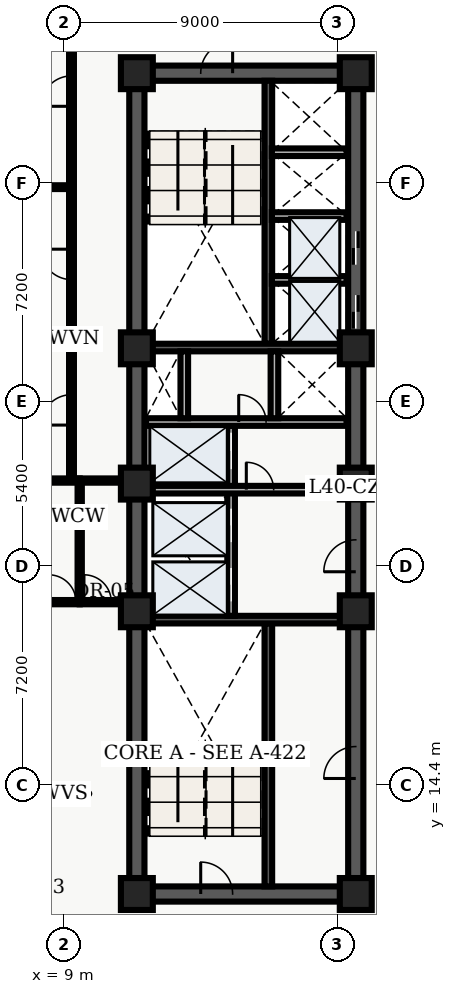
"""IFC4 building model, lengths in metres.
Left out: names, types, materials, properties, quantities, classifications, styles, units other than length and angle.
Written with IfcOpenShell. Run it as: python <this file> out.ifc"""

import sys

from ifc_helpers import new_model, entity, si_unit, converted_unit, direction, frame, origin_with_axes, origin_2d_with_axis, place, context, subcontext, project, spatial, polyline, rectangle, outline, extrude, element, fill, save


model = new_model("IFC4")
c1 = context("Model", 3, precision=1e-05, world=origin_with_axes(), true_north=direction((0.0, 1.0)))
c2 = subcontext(c1, "Body", "Model", "MODEL_VIEW")
j1 = project(units=[si_unit("LENGTHUNIT", "METRE"), converted_unit("PLANEANGLEUNIT", "DEGREE", entity("IfcPlaneAngleMeasure", 0.017), si_unit("PLANEANGLEUNIT", "RADIAN"), dimensions=[0, 0, 0, 0, 0, 0, 0])], contexts=[c1])
p1 = place(None, origin_with_axes())
s1 = spatial("IfcSite", under=j1, at=p1, CompositionType="ELEMENT")
p2 = place(p1, origin_with_axes())
s2 = spatial("IfcBuilding", under=s1, at=p2, CompositionType="ELEMENT")
p3 = place(p2, frame((0.0, 0.0, 164.1), z_axis=(0.0, 0.0, 1.0), x_axis=(1.0, 0.0, 0.0)))
s3 = spatial("IfcBuildingStorey", under=s2, at=p3, CompositionType="ELEMENT", Elevation=164.1)
p4 = place(p3, frame((11.4, 10.8, 0.0), z_axis=(0.0, 0.0, 1.0), x_axis=(0.0, 1.0, 0.0)))
e1 = element("IfcWall", 1, at=p4, inside=s3, PredefinedType="SHEAR", context=c2, shape_type="SweptSolid", body=[
    extrude(outline(polyline([(0.0, -0.25), (27.0, -0.25), (27.0, 0.25), (0.0, 0.25), (0.0, -0.25)])), origin_with_axes(), (0.0, 0.0, 1.0), 3.66),
])
p5 = place(p3, frame((11.4, 10.8, 0.0), z_axis=(0.0, 0.0, 1.0), x_axis=(1.0, 0.0, 0.0)))
e2 = element("IfcWall", 2, at=p5, inside=s3, PredefinedType="SHEAR", context=c2, shape_type="SweptSolid", body=[
    extrude(outline(polyline([(0.0, -0.25), (7.2, -0.25), (7.2, 0.25), (0.0, 0.25), (0.0, -0.25)])), origin_with_axes(), (0.0, 0.0, 1.0), 3.66),
])
p6 = place(p5, frame((2.625, 0.0, 0.0), z_axis=(0.0, 0.0, 1.0), x_axis=(1.0, 0.0, 0.0)))
e3 = element("IfcOpeningElement", 3, at=p6, cuts=e2, PredefinedType="OPENING", context=c2, shape_type="SweptSolid", body=[
    extrude(rectangle(XDim=1.05, YDim=0.52, at=origin_2d_with_axis()), origin_with_axes(), (0.0, 0.0, 1.0), 2.15),
])
p7 = place(p3, frame((11.4, 37.8, 0.0), z_axis=(0.0, 0.0, 1.0), x_axis=(1.0, 0.0, 0.0)))
e4 = element("IfcWall", 4, at=p7, inside=s3, PredefinedType="SHEAR", context=c2, shape_type="SweptSolid", body=[
    extrude(outline(polyline([(0.0, -0.25), (7.2, -0.25), (7.2, 0.25), (0.0, 0.25), (0.0, -0.25)])), origin_with_axes(), (0.0, 0.0, 1.0), 3.66),
])
p8 = place(p7, frame((2.625, 0.0, 0.0), z_axis=(0.0, 0.0, 1.0), x_axis=(1.0, 0.0, 0.0)))
e5 = element("IfcOpeningElement", 5, at=p8, cuts=e4, PredefinedType="OPENING", context=c2, shape_type="SweptSolid", body=[
    extrude(rectangle(XDim=1.05, YDim=0.52, at=origin_2d_with_axis()), origin_with_axes(), (0.0, 0.0, 1.0), 2.15),
])
p9 = place(p3, frame((18.6, 10.8, 0.0), z_axis=(0.0, 0.0, 1.0), x_axis=(0.0, 1.0, 0.0)))
e6 = element("IfcWall", 6, at=p9, inside=s3, PredefinedType="SHEAR", context=c2, shape_type="SweptSolid", body=[
    extrude(outline(polyline([(0.0, -0.25), (13.5, -0.25), (13.5, 0.25), (0.0, 0.25), (0.0, -0.25)])), origin_with_axes(), (0.0, 0.0, 1.0), 3.66),
])
p10 = place(p9, frame((11.125, 0.0, 0.0), z_axis=(0.0, 0.0, 1.0), x_axis=(1.0, 0.0, 0.0)))
e7 = element("IfcOpeningElement", 7, at=p10, cuts=e6, PredefinedType="OPENING", context=c2, shape_type="SweptSolid", body=[
    extrude(rectangle(XDim=1.05, YDim=0.52, at=origin_2d_with_axis()), origin_with_axes(), (0.0, 0.0, 1.0), 2.15),
])
p11 = place(p9, frame((4.325, 0.0, 0.0), z_axis=(0.0, 0.0, 1.0), x_axis=(1.0, 0.0, 0.0)))
e8 = element("IfcOpeningElement", 8, at=p11, cuts=e6, PredefinedType="OPENING", context=c2, shape_type="SweptSolid", body=[
    extrude(rectangle(XDim=1.05, YDim=0.52, at=origin_2d_with_axis()), origin_with_axes(), (0.0, 0.0, 1.0), 2.15),
])
p12 = place(p3, frame((18.6, 24.3, 0.0), z_axis=(0.0, 0.0, 1.0), x_axis=(0.0, 1.0, 0.0)))
e9 = element("IfcWall", 9, at=p12, inside=s3, PredefinedType="SHEAR", context=c2, shape_type="SweptSolid", body=[
    extrude(outline(polyline([(0.0, -0.25), (13.5, -0.25), (13.5, 0.25), (0.0, 0.25), (0.0, -0.25)])), origin_with_axes(), (0.0, 0.0, 1.0), 3.66),
])
p13 = place(p12, frame((5.65, 0.0, 0.0), z_axis=(0.0, 0.0, 1.0), x_axis=(1.0, 0.0, 0.0)))
e10 = element("IfcOpeningElement", 10, at=p13, cuts=e9, PredefinedType="OPENING", context=c2, shape_type="SweptSolid", body=[
    extrude(rectangle(XDim=1.1, YDim=0.52, at=origin_2d_with_axis()), origin_with_axes(), (0.0, 0.0, 1.0), 2.15),
])
p14 = place(p12, frame((7.75, 0.0, 0.0), z_axis=(0.0, 0.0, 1.0), x_axis=(1.0, 0.0, 0.0)))
e11 = element("IfcOpeningElement", 11, at=p14, cuts=e9, PredefinedType="OPENING", context=c2, shape_type="SweptSolid", body=[
    extrude(rectangle(XDim=1.1, YDim=0.52, at=origin_2d_with_axis()), origin_with_axes(), (0.0, 0.0, 1.0), 2.15),
])
p15 = place(p3, frame((15.725, 11.05, 0.0), z_axis=(0.0, 0.0, 1.0), x_axis=(0.0, 1.0, 0.0)))
e12 = element("IfcWall", 12, at=p15, inside=s3, PredefinedType="SHEAR", context=c2, shape_type="SweptSolid", body=[
    extrude(outline(polyline([(0.0, -0.125), (8.65, -0.125), (8.65, 0.125), (0.0, 0.125), (0.0, -0.125)])), origin_with_axes(), (0.0, 0.0, 1.0), 3.66),
])
p16 = place(p3, frame((11.65, 19.825, 0.0), z_axis=(0.0, 0.0, 1.0), x_axis=(1.0, 0.0, 0.0)))
e13 = element("IfcWall", 13, at=p16, inside=s3, PredefinedType="SHEAR", context=c2, shape_type="SweptSolid", body=[
    extrude(outline(polyline([(0.0, -0.125), (6.7, -0.125), (6.7, 0.125), (0.0, 0.125), (0.0, -0.125)])), origin_with_axes(), (0.0, 0.0, 1.0), 3.66),
])
p17 = place(p3, frame((15.725, 28.9, 0.0), z_axis=(0.0, 0.0, 1.0), x_axis=(0.0, 1.0, 0.0)))
e14 = element("IfcWall", 14, at=p17, inside=s3, PredefinedType="SHEAR", context=c2, shape_type="SweptSolid", body=[
    extrude(outline(polyline([(0.0, -0.125), (8.65, -0.125), (8.65, 0.125), (0.0, 0.125), (0.0, -0.125)])), origin_with_axes(), (0.0, 0.0, 1.0), 3.66),
])
p18 = place(p3, frame((11.65, 28.775, 0.0), z_axis=(0.0, 0.0, 1.0), x_axis=(1.0, 0.0, 0.0)))
e15 = element("IfcWall", 15, at=p18, inside=s3, PredefinedType="SHEAR", context=c2, shape_type="SweptSolid", body=[
    extrude(outline(polyline([(0.0, -0.125), (6.7, -0.125), (6.7, 0.125), (0.0, 0.125), (0.0, -0.125)])), origin_with_axes(), (0.0, 0.0, 1.0), 3.66),
])
p19 = place(p3, frame((14.5, 19.95, 0.0), z_axis=(0.0, 0.0, 1.0), x_axis=(0.0, 1.0, 0.0)))
e16 = element("IfcWall", 16, at=p19, inside=s3, PredefinedType="SOLIDWALL", context=c2, shape_type="SweptSolid", body=[
    extrude(outline(polyline([(0.0, -0.125), (6.25, -0.125), (6.25, 0.125), (0.0, 0.125), (0.0, -0.125)])), origin_with_axes(), (0.0, 0.0, 1.0), 2.7),
])
p20 = place(p19, frame((1.025, 0.0, 0.0), z_axis=(0.0, 0.0, 1.0), x_axis=(1.0, 0.0, 0.0)))
e17 = element("IfcOpeningElement", 17, at=p20, cuts=e16, PredefinedType="OPENING", context=c2, shape_type="SweptSolid", body=[
    extrude(rectangle(XDim=1.1, YDim=0.27, at=origin_2d_with_axis()), origin_with_axes(), (0.0, 0.0, 1.0), 2.15),
])
p21 = place(p19, frame((2.975, 0.0, 0.0), z_axis=(0.0, 0.0, 1.0), x_axis=(1.0, 0.0, 0.0)))
e18 = element("IfcOpeningElement", 18, at=p21, cuts=e16, PredefinedType="OPENING", context=c2, shape_type="SweptSolid", body=[
    extrude(rectangle(XDim=1.1, YDim=0.27, at=origin_2d_with_axis()), origin_with_axes(), (0.0, 0.0, 1.0), 2.15),
])
p22 = place(p19, frame((5.425, 0.0, 0.0), z_axis=(0.0, 0.0, 1.0), x_axis=(1.0, 0.0, 0.0)))
e19 = element("IfcOpeningElement", 19, at=p22, cuts=e16, PredefinedType="OPENING", context=c2, shape_type="SweptSolid", body=[
    extrude(rectangle(XDim=1.2, YDim=0.27, at=origin_2d_with_axis()), origin_with_axes(), (0.0, 0.0, 1.0), 2.15),
])
p23 = place(p3, frame((11.7, 24.1, 0.0), z_axis=(0.0, 0.0, 1.0), x_axis=(1.0, 0.0, 0.0)))
e20 = element("IfcWall", 20, at=p23, inside=s3, PredefinedType="SOLIDWALL", context=c2, shape_type="SweptSolid", body=[
    extrude(outline(polyline([(0.0, -0.125), (6.6, -0.125), (6.6, 0.125), (0.0, 0.125), (0.0, -0.125)])), origin_with_axes(), (0.0, 0.0, 1.0), 2.7),
])
p24 = place(p23, frame((3.75, 0.0, 0.0), z_axis=(0.0, 0.0, 1.0), x_axis=(1.0, 0.0, 0.0)))
e21 = element("IfcOpeningElement", 21, at=p24, cuts=e20, PredefinedType="OPENING", context=c2, shape_type="SweptSolid", body=[
    extrude(rectangle(XDim=0.9, YDim=0.27, at=origin_2d_with_axis()), origin_with_axes(), (0.0, 0.0, 1.0), 2.15),
])
p25 = place(p3, frame((11.7, 26.325, 0.0), z_axis=(0.0, 0.0, 1.0), x_axis=(1.0, 0.0, 0.0)))
e22 = element("IfcWall", 22, at=p25, inside=s3, PredefinedType="SOLIDWALL", context=c2, shape_type="SweptSolid", body=[
    extrude(outline(polyline([(0.0, -0.125), (6.6, -0.125), (6.6, 0.125), (0.0, 0.125), (0.0, -0.125)])), origin_with_axes(), (0.0, 0.0, 1.0), 2.7),
])
p26 = place(p25, frame((3.5, 0.0, 0.0), z_axis=(0.0, 0.0, 1.0), x_axis=(1.0, 0.0, 0.0)))
e23 = element("IfcOpeningElement", 23, at=p26, cuts=e22, PredefinedType="OPENING", context=c2, shape_type="SweptSolid", body=[
    extrude(rectangle(XDim=0.9, YDim=0.27, at=origin_2d_with_axis()), origin_with_axes(), (0.0, 0.0, 1.0), 2.15),
])
for number, where, z_axis, x_axis in (
    (24, (12.96, 26.45, 0.0), (0.0, 0.0, 1.0), (0.0, 1.0, 0.0)),
    (25, (15.925, 26.45, 0.0), (0.0, 0.0, 1.0), (0.0, 1.0, 0.0)),
):
    element("IfcWall", number, at=place(p3, frame(where, z_axis=z_axis, x_axis=x_axis)), inside=s3, PredefinedType="SOLIDWALL", context=c2, shape_type="SweptSolid", body=[
        extrude(outline(polyline([(0.0, -0.125), (2.2, -0.125), (2.2, 0.125), (0.0, 0.125), (0.0, -0.125)])), origin_with_axes(), (0.0, 0.0, 1.0), 2.7),
    ])
for number, where, z_axis, x_axis in (
    (26, (11.4, 10.8, 0.0), (0.0, 0.0, 1.0), (1.0, 0.0, 0.0)),
    (27, (11.4, 20.1, 0.0), (0.0, 0.0, 1.0), (1.0, 0.0, 0.0)),
    (28, (11.4, 24.3, 0.0), (0.0, 0.0, 1.0), (1.0, 0.0, 0.0)),
    (29, (11.4, 28.75, 0.0), (0.0, 0.0, 1.0), (1.0, 0.0, 0.0)),
    (30, (11.4, 37.8, 0.0), (0.0, 0.0, 1.0), (1.0, 0.0, 0.0)),
    (31, (18.6, 10.8, 0.0), (0.0, 0.0, 1.0), (1.0, 0.0, 0.0)),
    (32, (18.6, 20.1, 0.0), (0.0, 0.0, 1.0), (1.0, 0.0, 0.0)),
    (33, (18.6, 24.3, 0.0), (0.0, 0.0, 1.0), (1.0, 0.0, 0.0)),
    (34, (18.6, 28.75, 0.0), (0.0, 0.0, 1.0), (1.0, 0.0, 0.0)),
    (35, (18.6, 37.8, 0.0), (0.0, 0.0, 1.0), (1.0, 0.0, 0.0)),
):
    element("IfcColumn", number, at=place(p3, frame(where, z_axis=z_axis, x_axis=x_axis)), inside=s3, PredefinedType="COLUMN", context=c2, shape_type="SweptSolid", body=[
        extrude(rectangle(XDim=1.05, YDim=1.05, at=origin_2d_with_axis()), origin_with_axes(), (0.0, 0.0, 1.0), 3.9),
    ])
for number, where, z_axis, x_axis in (
    (36, (15.84, 31.0, 0.0), (0.0, 0.0, 1.0), (1.0, 0.0, 0.0)),
    (37, (15.84, 33.1, 0.0), (0.0, 0.0, 1.0), (1.0, 0.0, 0.0)),
    (38, (15.84, 35.2, 0.0), (0.0, 0.0, 1.0), (1.0, 0.0, 0.0)),
):
    element("IfcWall", number, at=place(p3, frame(where, z_axis=z_axis, x_axis=x_axis)), inside=s3, PredefinedType="SOLIDWALL", context=c2, shape_type="SweptSolid", body=[
        extrude(outline(polyline([(0.0, -0.125), (2.46, -0.125), (2.46, 0.125), (0.0, 0.125), (0.0, -0.125)])), origin_with_axes(), (0.0, 0.0, 1.0), 2.7),
    ])
p27 = place(p3, frame((9.52, 20.4, 0.0), z_axis=(0.0, 0.0, 1.0), x_axis=(0.0, 1.0, 0.0)))
e39 = element("IfcWall", 39, at=p27, inside=s3, PredefinedType="PARTITIONING", context=c2, shape_type="SweptSolid", body=[
    extrude(outline(polyline([(0.0, -0.07), (4.0, -0.07), (4.0, 0.07), (0.0, 0.07), (0.0, -0.07)])), origin_with_axes(), (0.0, 0.0, 1.0), 2.7),
])
p28 = place(p3, frame((9.52, 20.4, 0.0), z_axis=(0.0, 0.0, 1.0), x_axis=(1.0, 0.0, 0.0)))
e40 = element("IfcWall", 40, at=p28, inside=s3, PredefinedType="PARTITIONING", context=c2, shape_type="SweptSolid", body=[
    extrude(outline(polyline([(0.0, -0.07), (1.58, -0.07), (1.58, 0.07), (0.0, 0.07), (0.0, -0.07)])), origin_with_axes(), (0.0, 0.0, 1.0), 2.7),
])
p29 = place(p28, frame((0.59, 0.0, 0.0), z_axis=(0.0, 0.0, 1.0), x_axis=(1.0, 0.0, 0.0)))
e41 = element("IfcOpeningElement", 41, at=p29, cuts=e40, PredefinedType="OPENING", context=c2, shape_type="SweptSolid", body=[
    extrude(rectangle(XDim=0.9, YDim=0.16, at=origin_2d_with_axis()), origin_with_axes(), (0.0, 0.0, 1.0), 2.15),
])
p30 = place(p3, frame((9.52, 24.4, 0.0), z_axis=(0.0, 0.0, 1.0), x_axis=(1.0, 0.0, 0.0)))
e42 = element("IfcWall", 42, at=p30, inside=s3, PredefinedType="PARTITIONING", context=c2, shape_type="SweptSolid", body=[
    extrude(outline(polyline([(0.0, -0.07), (1.58, -0.07), (1.58, 0.07), (0.0, 0.07), (0.0, -0.07)])), origin_with_axes(), (0.0, 0.0, 1.0), 2.7),
])
p31 = place(p3, frame((9.25, 24.4, 0.0), z_axis=(0.0, 0.0, 1.0), x_axis=(0.0, 1.0, 0.0)))
e43 = element("IfcWall", 43, at=p31, inside=s3, PredefinedType="PARTITIONING", context=c2, shape_type="SweptSolid", body=[
    extrude(outline(polyline([(0.0, -0.08), (16.1, -0.08), (16.1, 0.08), (0.0, 0.08), (0.0, -0.08)])), origin_with_axes(), (0.0, 0.0, 1.0), 2.7),
])
p32 = place(p31, frame((2.325, 0.0, 0.0), z_axis=(0.0, 0.0, 1.0), x_axis=(1.0, 0.0, 0.0)))
e44 = element("IfcOpeningElement", 44, at=p32, cuts=e43, PredefinedType="OPENING", context=c2, shape_type="SweptSolid", body=[
    extrude(rectangle(XDim=1.0, YDim=0.18, at=origin_2d_with_axis()), origin_with_axes(), (0.0, 0.0, 1.0), 2.15),
])
p33 = place(p31, frame((7.111, 0.0, 0.0), z_axis=(0.0, 0.0, 1.0), x_axis=(1.0, 0.0, 0.0)))
e45 = element("IfcOpeningElement", 45, at=p33, cuts=e43, PredefinedType="OPENING", context=c2, shape_type="SweptSolid", body=[
    extrude(rectangle(XDim=1.0, YDim=0.18, at=origin_2d_with_axis()), origin_with_axes(), (0.0, 0.0, 1.0), 2.15),
])
p34 = place(p31, frame((12.81, 0.0, 0.0), z_axis=(0.0, 0.0, 1.0), x_axis=(1.0, 0.0, 0.0)))
e46 = element("IfcOpeningElement", 46, at=p34, cuts=e43, PredefinedType="OPENING", context=c2, shape_type="SweptSolid", body=[
    extrude(rectangle(XDim=1.0, YDim=0.18, at=origin_2d_with_axis()), origin_with_axes(), (0.0, 0.0, 1.0), 2.15),
])
p35 = place(p3, frame((0.335, 20.4, 0.0), z_axis=(0.0, 0.0, 1.0), x_axis=(1.0, 0.0, 0.0)))
e47 = element("IfcWall", 47, at=p35, inside=s3, PredefinedType="PARTITIONING", context=c2, shape_type="SweptSolid", body=[
    extrude(outline(polyline([(0.0, -0.07), (9.185, -0.07), (9.185, 0.07), (0.0, 0.07), (0.0, -0.07)])), origin_with_axes(), (0.0, 0.0, 1.0), 2.7),
])
p36 = place(p35, frame((8.615, 0.0, 0.0), z_axis=(0.0, 0.0, 1.0), x_axis=(1.0, 0.0, 0.0)))
e48 = element("IfcOpeningElement", 48, at=p36, cuts=e47, PredefinedType="OPENING", context=c2, shape_type="SweptSolid", body=[
    extrude(rectangle(XDim=0.9, YDim=0.16, at=origin_2d_with_axis()), origin_with_axes(), (0.0, 0.0, 1.0), 2.15),
])
p37 = place(p3, frame((0.335, 24.4, 0.0), z_axis=(0.0, 0.0, 1.0), x_axis=(1.0, 0.0, 0.0)))
e49 = element("IfcWall", 49, at=p37, inside=s3, PredefinedType="PARTITIONING", context=c2, shape_type="SweptSolid", body=[
    extrude(outline(polyline([(0.0, -0.07), (9.185, -0.07), (9.185, 0.07), (0.0, 0.07), (0.0, -0.07)])), origin_with_axes(), (0.0, 0.0, 1.0), 2.7),
])
p38 = place(p3, frame((0.335, 28.97, 0.0), z_axis=(0.0, 0.0, 1.0), x_axis=(1.0, 0.0, 0.0)))
e50 = element("IfcWall", 50, at=p38, inside=s3, PredefinedType="PARTITIONING", context=c2, shape_type="SweptSolid", body=[
    extrude(outline(polyline([(0.0, -0.14), (8.795, -0.14), (8.795, 0.14), (0.0, 0.14), (0.0, -0.14)])), origin_with_axes(), (0.0, 0.0, 1.0), 2.7),
])
p39 = place(p3, frame((0.335, 34.051, 0.0), z_axis=(0.0, 0.0, 1.0), x_axis=(1.0, 0.0, 0.0)))
e51 = element("IfcWall", 51, at=p39, inside=s3, PredefinedType="PARTITIONING", context=c2, shape_type="SweptSolid", body=[
    extrude(outline(polyline([(0.0, -0.062), (8.795, -0.062), (8.795, 0.062), (0.0, 0.062), (0.0, -0.062)])), origin_with_axes(), (0.0, 0.0, 1.0), 2.7),
])
p40 = place(p12, frame((5.65, 0.0, 0.0), z_axis=(0.0, 0.0, 1.0), x_axis=(1.0, 0.0, 0.0)))
e52 = element("IfcDoor", 52, at=p40, inside=s3, OperationType="SLIDING_TO_LEFT", PredefinedType="DOOR", context=c2, shape_type="SweptSolid", body=[
    extrude(rectangle(XDim=1.1, YDim=0.09, at=origin_2d_with_axis()), origin_with_axes(), (0.0, 0.0, 1.0), 2.15),
])
fill(e10, e52)
p41 = place(p12, frame((7.75, 0.0, 0.0), z_axis=(0.0, 0.0, 1.0), x_axis=(1.0, 0.0, 0.0)))
e53 = element("IfcDoor", 53, at=p41, inside=s3, OperationType="SLIDING_TO_RIGHT", PredefinedType="DOOR", context=c2, shape_type="SweptSolid", body=[
    extrude(rectangle(XDim=1.1, YDim=0.09, at=origin_2d_with_axis()), origin_with_axes(), (0.0, 0.0, 1.0), 2.15),
])
fill(e11, e53)
p42 = place(p19, frame((1.025, 0.0, 0.0), z_axis=(0.0, 0.0, 1.0), x_axis=(1.0, 0.0, 0.0)))
e54 = element("IfcDoor", 54, at=p42, inside=s3, OperationType="SLIDING_TO_LEFT", PredefinedType="DOOR", context=c2, shape_type="SweptSolid", body=[
    extrude(rectangle(XDim=1.1, YDim=0.09, at=origin_2d_with_axis()), origin_with_axes(), (0.0, 0.0, 1.0), 2.15),
])
fill(e17, e54)
p43 = place(p19, frame((2.975, 0.0, 0.0), z_axis=(0.0, 0.0, 1.0), x_axis=(1.0, 0.0, 0.0)))
e55 = element("IfcDoor", 55, at=p43, inside=s3, OperationType="SLIDING_TO_RIGHT", PredefinedType="DOOR", context=c2, shape_type="SweptSolid", body=[
    extrude(rectangle(XDim=1.1, YDim=0.09, at=origin_2d_with_axis()), origin_with_axes(), (0.0, 0.0, 1.0), 2.15),
])
fill(e18, e55)
p44 = place(p19, frame((5.425, 0.0, 0.0), z_axis=(0.0, 0.0, 1.0), x_axis=(1.0, 0.0, 0.0)))
e56 = element("IfcDoor", 56, at=p44, inside=s3, OperationType="DOUBLE_DOOR_SLIDING", PredefinedType="DOOR", context=c2, shape_type="SweptSolid", body=[
    extrude(rectangle(XDim=1.2, YDim=0.09, at=origin_2d_with_axis()), origin_with_axes(), (0.0, 0.0, 1.0), 2.15),
])
fill(e19, e56)
p45 = place(p5, frame((2.625, 0.0, 0.0), z_axis=(0.0, 0.0, 1.0), x_axis=(1.0, 0.0, 0.0)))
e57 = element("IfcDoor", 57, at=p45, inside=s3, OperationType="SINGLE_SWING_LEFT", PredefinedType="DOOR", context=c2, shape_type="SweptSolid", body=[
    extrude(rectangle(XDim=1.05, YDim=0.09, at=origin_2d_with_axis()), origin_with_axes(), (0.0, 0.0, 1.0), 2.15),
])
fill(e3, e57)
p46 = place(p7, frame((2.625, 0.0, 0.0), z_axis=(0.0, 0.0, 1.0), x_axis=(1.0, 0.0, 0.0)))
e58 = element("IfcDoor", 58, at=p46, inside=s3, OperationType="SINGLE_SWING_RIGHT", PredefinedType="DOOR", context=c2, shape_type="SweptSolid", body=[
    extrude(rectangle(XDim=1.05, YDim=0.09, at=origin_2d_with_axis()), origin_with_axes(), (0.0, 0.0, 1.0), 2.15),
])
fill(e5, e58)
p47 = place(p9, frame((11.125, 0.0, 0.0), z_axis=(0.0, 0.0, 1.0), x_axis=(1.0, 0.0, 0.0)))
e59 = element("IfcDoor", 59, at=p47, inside=s3, OperationType="SINGLE_SWING_LEFT", PredefinedType="DOOR", context=c2, shape_type="SweptSolid", body=[
    extrude(rectangle(XDim=1.05, YDim=0.09, at=origin_2d_with_axis()), origin_with_axes(), (0.0, 0.0, 1.0), 2.15),
])
fill(e7, e59)
p48 = place(p23, frame((3.75, 0.0, 0.0), z_axis=(0.0, 0.0, 1.0), x_axis=(1.0, 0.0, 0.0)))
e60 = element("IfcDoor", 60, at=p48, inside=s3, OperationType="SINGLE_SWING_LEFT", PredefinedType="DOOR", context=c2, shape_type="SweptSolid", body=[
    extrude(rectangle(XDim=0.9, YDim=0.09, at=origin_2d_with_axis()), origin_with_axes(), (0.0, 0.0, 1.0), 2.15),
])
fill(e21, e60)
p49 = place(p25, frame((3.5, 0.0, 0.0), z_axis=(0.0, 0.0, 1.0), x_axis=(1.0, 0.0, 0.0)))
e61 = element("IfcDoor", 61, at=p49, inside=s3, OperationType="SINGLE_SWING_LEFT", PredefinedType="DOOR", context=c2, shape_type="SweptSolid", body=[
    extrude(rectangle(XDim=0.9, YDim=0.09, at=origin_2d_with_axis()), origin_with_axes(), (0.0, 0.0, 1.0), 2.15),
])
fill(e23, e61)
p50 = place(p9, frame((4.325, 0.0, 0.0), z_axis=(0.0, 0.0, 1.0), x_axis=(1.0, 0.0, 0.0)))
e62 = element("IfcDoor", 62, at=p50, inside=s3, OperationType="SINGLE_SWING_LEFT", PredefinedType="DOOR", context=c2, shape_type="SweptSolid", body=[
    extrude(rectangle(XDim=1.05, YDim=0.09, at=origin_2d_with_axis()), origin_with_axes(), (0.0, 0.0, 1.0), 2.15),
])
fill(e8, e62)
p51 = place(p28, frame((0.59, 0.0, 0.0), z_axis=(0.0, 0.0, 1.0), x_axis=(1.0, 0.0, 0.0)))
e63 = element("IfcDoor", 63, at=p51, inside=s3, OperationType="SINGLE_SWING_LEFT", PredefinedType="DOOR", context=c2, shape_type="SweptSolid", body=[
    extrude(rectangle(XDim=0.9, YDim=0.084, at=origin_2d_with_axis()), origin_with_axes(), (0.0, 0.0, 1.0), 2.15),
])
fill(e41, e63)
p52 = place(p35, frame((8.615, 0.0, 0.0), z_axis=(0.0, 0.0, 1.0), x_axis=(1.0, 0.0, 0.0)))
e64 = element("IfcDoor", 64, at=p52, inside=s3, OperationType="SINGLE_SWING_LEFT", PredefinedType="DOOR", context=c2, shape_type="SweptSolid", body=[
    extrude(rectangle(XDim=0.9, YDim=0.084, at=origin_2d_with_axis()), origin_with_axes(), (0.0, 0.0, 1.0), 2.15),
])
fill(e48, e64)
p53 = place(p31, frame((2.325, 0.0, 0.0), z_axis=(0.0, 0.0, 1.0), x_axis=(1.0, 0.0, 0.0)))
e65 = element("IfcDoor", 65, at=p53, inside=s3, OperationType="SINGLE_SWING_LEFT", PredefinedType="DOOR", context=c2, shape_type="SweptSolid", body=[
    extrude(rectangle(XDim=1.0, YDim=0.09, at=origin_2d_with_axis()), origin_with_axes(), (0.0, 0.0, 1.0), 2.15),
])
fill(e44, e65)
p54 = place(p31, frame((7.111, 0.0, 0.0), z_axis=(0.0, 0.0, 1.0), x_axis=(1.0, 0.0, 0.0)))
e66 = element("IfcDoor", 66, at=p54, inside=s3, OperationType="SINGLE_SWING_RIGHT", PredefinedType="DOOR", context=c2, shape_type="SweptSolid", body=[
    extrude(rectangle(XDim=1.0, YDim=0.09, at=origin_2d_with_axis()), origin_with_axes(), (0.0, 0.0, 1.0), 2.15),
])
fill(e45, e66)
p55 = place(p31, frame((12.81, 0.0, 0.0), z_axis=(0.0, 0.0, 1.0), x_axis=(1.0, 0.0, 0.0)))
e67 = element("IfcDoor", 67, at=p55, inside=s3, OperationType="SINGLE_SWING_LEFT", PredefinedType="DOOR", context=c2, shape_type="SweptSolid", body=[
    extrude(rectangle(XDim=1.0, YDim=0.09, at=origin_2d_with_axis()), origin_with_axes(), (0.0, 0.0, 1.0), 2.15),
])
fill(e46, e67)
save(model, sys.argv[1])
